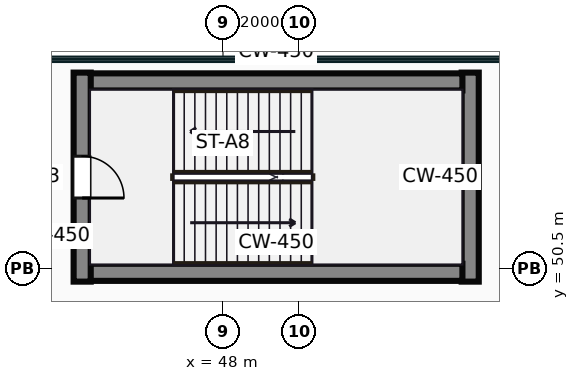
"""IFC4 building model, lengths in metres.
Left out: names, types, materials, properties, quantities, classifications, styles, units other than length and angle.
Written with IfcOpenShell. Run it as: python <this file> out.ifc"""

import sys

from ifc_helpers import new_model, si_unit, direction, frame, frame_2d, origin, place, context, subcontext, project, spatial, rectangle, extrude, source, transform, mapped, element, fill, save


model = new_model("IFC4")
c1 = context("Model", 3, precision=1e-05, world=origin(), true_north=direction((0.0, 1.0)))
c2 = subcontext(c1, "Body", "Model", "MODEL_VIEW")
j1 = project(units=[si_unit("LENGTHUNIT", "METRE"), si_unit("PLANEANGLEUNIT", "RADIAN")], contexts=[c1])
p1 = place(None, origin())
s1 = spatial("IfcSite", under=j1, at=p1, CompositionType="ELEMENT")
p2 = place(p1, origin())
s2 = spatial("IfcBuilding", under=s1, at=p2, CompositionType="ELEMENT")
p3 = place(p2, frame((0.0, 0.0, 11.0)))
s3 = spatial("IfcBuildingStorey", under=s2, at=p3, CompositionType="ELEMENT", Elevation=11.0)
m1 = source(origin(), c2, "Body", "SweptSolid", [
    extrude(rectangle(XDim=5.5, YDim=0.45, at=frame_2d((2.75, 0.0))), origin(), (0.0, 0.0, 1.0), 5.0),
])
p4 = place(p3, frame((44.295, 50.15, 0.0), z_axis=(0.0, 0.0, 1.0), x_axis=(0.0, 1.0, 0.0)))
e1 = element("IfcWall", 1, at=p4, inside=s3, PredefinedType="SHEAR", context=c2, shape_type="MappedRepresentation", body=[
    mapped(m1, transform((0.0, 0.0, 0.0))),
])
p5 = place(p4, frame((2.2, 0.0, 0.0)))
e2 = element("IfcOpeningElement", 2, at=p5, cuts=e1, PredefinedType="OPENING", context=c2, shape_type="SweptSolid", body=[
    extrude(rectangle(XDim=1.1, YDim=2.15, at=frame_2d((0.55, 1.075))), frame((0.0, 0.235, 0.0), z_axis=(0.0, -1.0, 0.0), x_axis=(1.0, 0.0, 0.0)), (0.0, 0.0, 1.0), 0.47),
])
m2 = source(origin(), c2, "Body", "SweptSolid", [
    extrude(rectangle(XDim=9.8, YDim=0.45, at=frame_2d((4.9, 0.0))), origin(), (0.0, 0.0, 1.0), 5.0),
])
for number, where, z_axis, x_axis in (
    (3, (44.5, 50.395, 0.0), (0.0, 0.0, 1.0), (1.0, 0.0, 0.0)),
    (4, (44.5, 55.405, 0.0), (0.0, 0.0, 1.0), (1.0, 0.0, 0.0)),
):
    element("IfcWall", number, at=place(p3, frame(where, z_axis=z_axis, x_axis=x_axis)), inside=s3, PredefinedType="SHEAR", context=c2, shape_type="MappedRepresentation", body=[
        mapped(m2, transform((0.0, 0.0, 0.0))),
    ])
p6 = place(p3, frame((54.505, 50.15, 0.0), z_axis=(0.0, 0.0, 1.0), x_axis=(0.0, 1.0, 0.0)))
e5 = element("IfcWall", 5, at=p6, inside=s3, PredefinedType="SHEAR", context=c2, shape_type="MappedRepresentation", body=[
    mapped(m1, transform((0.0, 0.0, 0.0))),
])
m3 = source(origin(), c2, "Body", "SweptSolid", [
    extrude(rectangle(XDim=1.1, YDim=2.15, at=frame_2d((0.55, 1.075))), frame((0.0, 0.025, 0.0), z_axis=(0.0, -1.0, 0.0), x_axis=(1.0, 0.0, 0.0)), (0.0, 0.0, 1.0), 0.05),
])
p7 = place(p5, frame((1.1, 0.0, 0.0), z_axis=(0.0, 0.0, 1.0), x_axis=(-1.0, 0.0, 0.0)))
e6 = element("IfcDoor", 6, at=p7, inside=s3, OperationType="SINGLE_SWING_LEFT", PredefinedType="DOOR", context=c2, shape_type="MappedRepresentation", body=[
    mapped(m3, transform((0.0, 0.0, 0.0))),
])
fill(e2, e6)
save(model, sys.argv[1])
